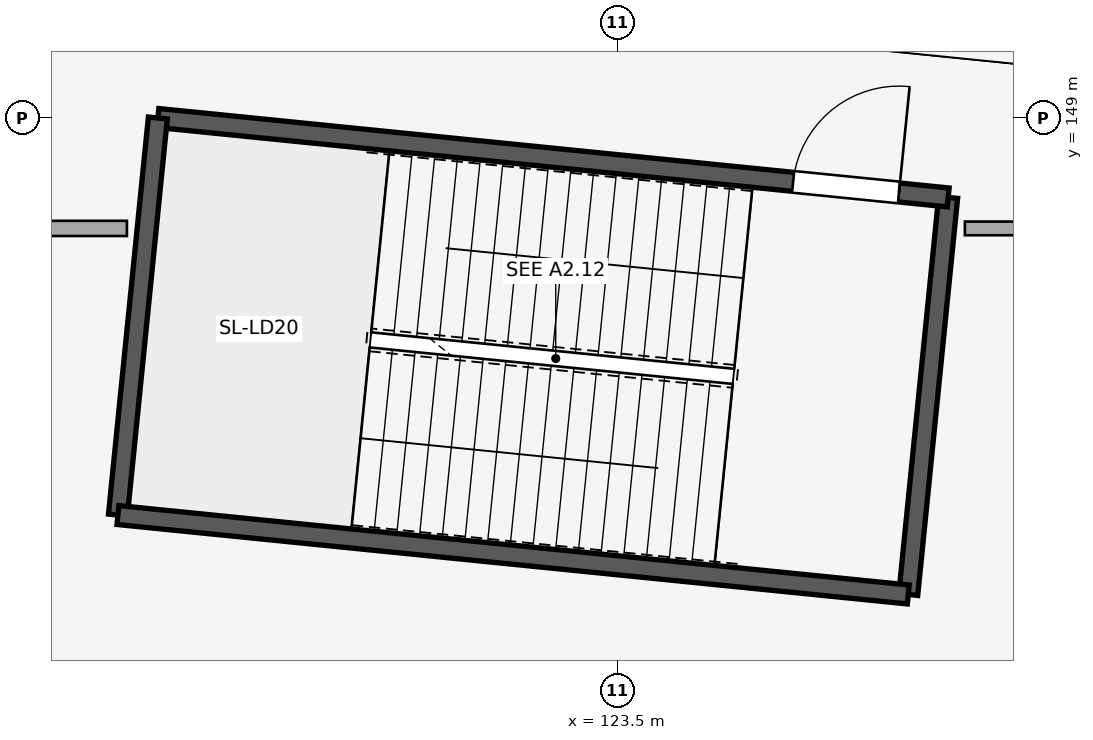
"""IFC4 building model, lengths in metres.
Left out: names, types, materials, properties, quantities, classifications, styles, units other than length and angle.
Written with IfcOpenShell. Run it as: python <this file> out.ifc"""

import sys

from ifc_helpers import new_model, si_unit, direction, frame, frame_2d, origin, place, context, subcontext, project, spatial, rectangle, extrude, element, fill, save


model = new_model("IFC4")
c1 = context("Model", 3, precision=1e-05, world=origin(), true_north=direction((0.0, 1.0)))
c2 = subcontext(c1, "Body", "Model", "MODEL_VIEW")
j1 = project(units=[si_unit("LENGTHUNIT", "METRE"), si_unit("PLANEANGLEUNIT", "RADIAN")], contexts=[c1])
p1 = place(None, origin())
s1 = spatial("IfcSite", under=j1, at=p1, CompositionType="ELEMENT")
p2 = place(p1, origin())
s2 = spatial("IfcBuilding", under=s1, at=p2, CompositionType="ELEMENT")
p3 = place(p2, origin())
s3 = spatial("IfcBuildingStorey", under=s2, at=p3, CompositionType="ELEMENT", Elevation=0.0)
p4 = place(p3, frame((127.319, 142.734, 0.0), z_axis=(0.0, 0.0, 1.0), x_axis=(0.10002396577, 0.994985028165, 0.0)))
e1 = element("IfcWall", 1, at=p4, inside=s3, PredefinedType="SHEAR", context=c2, shape_type="SweptSolid", body=[
    extrude(rectangle(XDim=5.25, YDim=0.25, at=frame_2d((2.625, 0.0))), origin(), (0.0, 0.0, 1.0), 4.94),
])
p5 = place(p3, frame((127.844, 147.958, 0.0), z_axis=(0.0, 0.0, 1.0), x_axis=(-0.994988263568, 0.09999177647, 0.0)))
e2 = element("IfcWall", 2, at=p5, inside=s3, PredefinedType="SHEAR", context=c2, shape_type="SweptSolid", body=[
    extrude(rectangle(XDim=10.45, YDim=0.25, at=frame_2d((5.225, 0.0))), origin(), (0.0, 0.0, 1.0), 4.94),
])
p6 = place(p5, frame((0.65, 0.0, 0.0)))
e3 = element("IfcOpeningElement", 3, at=p6, cuts=e2, PredefinedType="OPENING", context=c2, shape_type="SweptSolid", body=[
    extrude(rectangle(XDim=1.4, YDim=2.2, at=frame_2d((0.7, 1.1))), frame((0.0, 0.135, 0.0), z_axis=(0.0, -1.0, 0.0), x_axis=(1.0, 0.0, 0.0)), (0.0, 0.0, 1.0), 0.27),
])
p7 = place(p3, frame((117.447, 149.003, 0.0), z_axis=(0.0, 0.0, 1.0), x_axis=(-0.099982555566, -0.994989190184, 0.0)))
e4 = element("IfcWall", 4, at=p7, inside=s3, PredefinedType="SHEAR", context=c2, shape_type="SweptSolid", body=[
    extrude(rectangle(XDim=5.25, YDim=0.25, at=frame_2d((2.625, 0.0))), origin(), (0.0, 0.0, 1.0), 4.94),
])
p8 = place(p3, frame((116.922, 143.779, 0.0), z_axis=(0.0, 0.0, 1.0), x_axis=(0.994985705245, -0.100017230303, 0.0)))
e5 = element("IfcWall", 5, at=p8, inside=s3, PredefinedType="SHEAR", context=c2, shape_type="SweptSolid", body=[
    extrude(rectangle(XDim=10.45, YDim=0.25, at=frame_2d((5.225, 0.0))), origin(), (0.0, 0.0, 1.0), 4.94),
])
p9 = place(p3, frame((104.96, 147.55, 0.0), z_axis=(0.0, 0.0, 1.0), x_axis=(1.0, 0.0, 0.0)))
e6 = element("IfcWall", 6, at=p9, inside=s3, PredefinedType="PARTITIONING", context=c2, shape_type="SweptSolid", body=[
    extrude(rectangle(XDim=12.079, YDim=0.2, at=frame_2d((6.04, 0.0))), origin(), (0.0, 0.0, 1.0), 3.69),
])
p10 = place(p9, frame((8.729, 0.0, 0.0)))
e7 = element("IfcOpeningElement", 7, at=p10, cuts=e6, PredefinedType="OPENING", context=c2, shape_type="SweptSolid", body=[
    extrude(rectangle(XDim=1.24, YDim=2.1, at=frame_2d((0.62, 1.05))), frame((0.0, 0.11, 0.0), z_axis=(0.0, -1.0, 0.0), x_axis=(1.0, 0.0, 0.0)), (0.0, 0.0, 1.0), 0.22),
])
p11 = place(p3, frame((128.064, 147.55, 0.0), z_axis=(0.0, 0.0, 1.0), x_axis=(1.0, 0.0, 0.0)))
e8 = element("IfcWall", 8, at=p11, inside=s3, PredefinedType="PARTITIONING", context=c2, shape_type="SweptSolid", body=[
    extrude(rectangle(XDim=19.351, YDim=0.18, at=frame_2d((9.675, 0.0))), origin(), (0.0, 0.0, 1.0), 3.69),
])
p12 = place(p11, frame((16.001, 0.0, 0.0)))
e9 = element("IfcOpeningElement", 9, at=p12, cuts=e8, PredefinedType="OPENING", context=c2, shape_type="SweptSolid", body=[
    extrude(rectangle(XDim=1.24, YDim=2.38, at=frame_2d((0.62, 1.19))), frame((0.0, 0.1, 0.0), z_axis=(0.0, -1.0, 0.0), x_axis=(1.0, 0.0, 0.0)), (0.0, 0.0, 1.0), 0.2),
])
p13 = place(p6, frame((1.4, 0.0, 0.0), z_axis=(0.0, 0.0, 1.0), x_axis=(-1.0, 0.0, 0.0)))
e10 = element("IfcDoor", 10, at=p13, inside=s3, OperationType="SINGLE_SWING_RIGHT", PredefinedType="DOOR", context=c2, shape_type="SweptSolid", body=[
    extrude(rectangle(XDim=1.4, YDim=2.2, at=frame_2d((0.7, 1.1))), frame((0.0, 0.025, 0.0), z_axis=(0.0, -1.0, 0.0), x_axis=(1.0, 0.0, 0.0)), (0.0, 0.0, 1.0), 0.05),
])
fill(e3, e10)
save(model, sys.argv[1])
